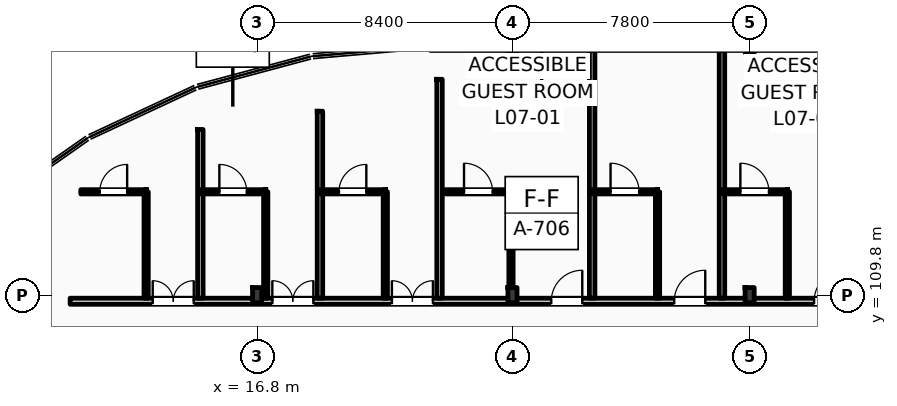
"""IFC4 building model, lengths in metres.
Left out: names, types, materials, properties, quantities, classifications, styles, units other than length and angle.
Written with IfcOpenShell. Run it as: python <this file> out.ifc"""

import sys

from ifc_helpers import new_model, si_unit, direction, frame, frame_2d, origin, origin_2d, place, context, subcontext, project, spatial, rectangle, i_section, extrude, element, fill, save


model = new_model("IFC4")
c1 = context("Model", 3, precision=1e-05, world=origin(), true_north=direction((0.0, 1.0)))
c2 = subcontext(c1, "Body", "Model", "MODEL_VIEW")
j1 = project(units=[si_unit("LENGTHUNIT", "METRE"), si_unit("PLANEANGLEUNIT", "RADIAN")], contexts=[c1])
p1 = place(None, origin())
s1 = spatial("IfcSite", under=j1, at=p1, CompositionType="ELEMENT")
p2 = place(p1, origin())
s2 = spatial("IfcBuilding", under=s1, at=p2, CompositionType="ELEMENT")
p3 = place(p2, frame((0.0, 0.0, 31.8)))
s3 = spatial("IfcBuildingStorey", under=s2, at=p3, CompositionType="ELEMENT", Elevation=31.8)
for number, where, z_axis, x_axis in (
    (1, (16.8, 109.8, 0.0), (0.0, 0.0, 1.0), (1.0, 0.0, 0.0)),
    (2, (25.2, 109.8, 0.0), (0.0, 0.0, 1.0), (1.0, 0.0, 0.0)),
):
    element("IfcColumn", number, at=place(p3, frame(where, z_axis=z_axis, x_axis=x_axis)), inside=s3, PredefinedType="COLUMN", context=c2, shape_type="SweptSolid", body=[
        extrude(i_section(OverallWidth=0.3, OverallDepth=0.5, WebThickness=0.014, FlangeThickness=0.028, FilletRadius=0.027, at=origin_2d()), origin(), (0.0, 0.0, 1.0), 3.6),
    ])
p4 = place(p3, frame((25.2, 118.0, 0.0), z_axis=(0.0, 0.0, 1.0), x_axis=(1.0, 0.0, 0.0)))
e3 = element("IfcColumn", 3, at=p4, inside=s3, PredefinedType="COLUMN", context=c2, shape_type="SweptSolid", body=[
    extrude(i_section(OverallWidth=0.3, OverallDepth=0.45, WebThickness=0.014, FlangeThickness=0.026, FilletRadius=0.027, at=origin_2d()), origin(), (0.0, 0.0, 1.0), 3.6),
])
p5 = place(p3, frame((33.0, 109.8, 0.0), z_axis=(0.0, 0.0, 1.0), x_axis=(1.0, 0.0, 0.0)))
e4 = element("IfcColumn", 4, at=p5, inside=s3, PredefinedType="COLUMN", context=c2, shape_type="SweptSolid", body=[
    extrude(i_section(OverallWidth=0.3, OverallDepth=0.5, WebThickness=0.014, FlangeThickness=0.028, FilletRadius=0.027, at=origin_2d()), origin(), (0.0, 0.0, 1.0), 3.6),
])
p6 = place(p3, frame((33.0, 118.0, 0.0), z_axis=(0.0, 0.0, 1.0), x_axis=(1.0, 0.0, 0.0)))
e5 = element("IfcColumn", 5, at=p6, inside=s3, PredefinedType="COLUMN", context=c2, shape_type="SweptSolid", body=[
    extrude(i_section(OverallWidth=0.3, OverallDepth=0.45, WebThickness=0.014, FlangeThickness=0.026, FilletRadius=0.027, at=origin_2d()), origin(), (0.0, 0.0, 1.0), 3.6),
])
p7 = place(p3, frame((10.65, 109.6, 0.0), z_axis=(0.0, 0.0, 1.0), x_axis=(1.0, 0.0, 0.0)))
e6 = element("IfcWall", 6, at=p7, inside=s3, PredefinedType="PARTITIONING", context=c2, shape_type="SweptSolid", body=[
    extrude(rectangle(XDim=109.21, YDim=0.2, at=frame_2d((54.605, 0.0))), origin(), (0.0, 0.0, 1.0), 2.72),
])
p8 = place(p7, frame((15.825, 0.0, 0.0)))
e7 = element("IfcOpeningElement", 7, at=p8, cuts=e6, PredefinedType="OPENING", context=c2, shape_type="SweptSolid", body=[
    extrude(rectangle(XDim=1.02, YDim=2.2, at=frame_2d((0.51, 1.1))), frame((0.0, 0.11, 0.0), z_axis=(0.0, -1.0, 0.0), x_axis=(1.0, 0.0, 0.0)), (0.0, 0.0, 1.0), 0.22),
])
p9 = place(p7, frame((19.87, 0.0, 0.0)))
e8 = element("IfcOpeningElement", 8, at=p9, cuts=e6, PredefinedType="OPENING", context=c2, shape_type="SweptSolid", body=[
    extrude(rectangle(XDim=1.02, YDim=2.2, at=frame_2d((0.51, 1.1))), frame((0.0, 0.11, 0.0), z_axis=(0.0, -1.0, 0.0), x_axis=(1.0, 0.0, 0.0)), (0.0, 0.0, 1.0), 0.22),
])
p10 = place(p7, frame((24.47, 0.0, 0.0)))
e9 = element("IfcOpeningElement", 9, at=p10, cuts=e6, PredefinedType="OPENING", context=c2, shape_type="SweptSolid", body=[
    extrude(rectangle(XDim=1.02, YDim=2.2, at=frame_2d((0.51, 1.1))), frame((0.0, 0.11, 0.0), z_axis=(0.0, -1.0, 0.0), x_axis=(1.0, 0.0, 0.0)), (0.0, 0.0, 1.0), 0.22),
])
p11 = place(p7, frame((26.92, 0.0, 0.0)))
e10 = element("IfcOpeningElement", 10, at=p11, cuts=e6, PredefinedType="OPENING", context=c2, shape_type="SweptSolid", body=[
    extrude(rectangle(XDim=1.02, YDim=2.2, at=frame_2d((0.51, 1.1))), frame((0.0, 0.11, 0.0), z_axis=(0.0, -1.0, 0.0), x_axis=(1.0, 0.0, 0.0)), (0.0, 0.0, 1.0), 0.22),
])
p12 = place(p7, frame((33.7, 0.0, 0.0)))
e11 = element("IfcOpeningElement", 11, at=p12, cuts=e6, PredefinedType="OPENING", context=c2, shape_type="SweptSolid", body=[
    extrude(rectangle(XDim=0.96, YDim=2.2, at=frame_2d((0.48, 1.1))), frame((0.0, 0.11, 0.0), z_axis=(0.0, -1.0, 0.0), x_axis=(1.0, 0.0, 0.0)), (0.0, 0.0, 1.0), 0.22),
])
p13 = place(p7, frame((35.9, 0.0, 0.0)))
e12 = element("IfcOpeningElement", 12, at=p13, cuts=e6, PredefinedType="OPENING", context=c2, shape_type="SweptSolid", body=[
    extrude(rectangle(XDim=0.96, YDim=2.2, at=frame_2d((0.48, 1.1))), frame((0.0, 0.11, 0.0), z_axis=(0.0, -1.0, 0.0), x_axis=(1.0, 0.0, 0.0)), (0.0, 0.0, 1.0), 0.22),
])
p14 = place(p7, frame((42.9, 0.0, 0.0)))
e13 = element("IfcOpeningElement", 13, at=p14, cuts=e6, PredefinedType="OPENING", context=c2, shape_type="SweptSolid", body=[
    extrude(rectangle(XDim=0.96, YDim=2.2, at=frame_2d((0.48, 1.1))), frame((0.0, 0.11, 0.0), z_axis=(0.0, -1.0, 0.0), x_axis=(1.0, 0.0, 0.0)), (0.0, 0.0, 1.0), 0.22),
])
p15 = place(p7, frame((47.5, 0.0, 0.0)))
e14 = element("IfcOpeningElement", 14, at=p15, cuts=e6, PredefinedType="OPENING", context=c2, shape_type="SweptSolid", body=[
    extrude(rectangle(XDim=0.96, YDim=2.2, at=frame_2d((0.48, 1.1))), frame((0.0, 0.11, 0.0), z_axis=(0.0, -1.0, 0.0), x_axis=(1.0, 0.0, 0.0)), (0.0, 0.0, 1.0), 0.22),
])
p16 = place(p7, frame((49.95, 0.0, 0.0)))
e15 = element("IfcOpeningElement", 15, at=p16, cuts=e6, PredefinedType="OPENING", context=c2, shape_type="SweptSolid", body=[
    extrude(rectangle(XDim=0.96, YDim=2.2, at=frame_2d((0.48, 1.1))), frame((0.0, 0.11, 0.0), z_axis=(0.0, -1.0, 0.0), x_axis=(1.0, 0.0, 0.0)), (0.0, 0.0, 1.0), 0.22),
])
p17 = place(p7, frame((56.7, 0.0, 0.0)))
e16 = element("IfcOpeningElement", 16, at=p17, cuts=e6, PredefinedType="OPENING", context=c2, shape_type="SweptSolid", body=[
    extrude(rectangle(XDim=0.96, YDim=2.2, at=frame_2d((0.48, 1.1))), frame((0.0, 0.11, 0.0), z_axis=(0.0, -1.0, 0.0), x_axis=(1.0, 0.0, 0.0)), (0.0, 0.0, 1.0), 0.22),
])
p18 = place(p7, frame((59.15, 0.0, 0.0)))
e17 = element("IfcOpeningElement", 17, at=p18, cuts=e6, PredefinedType="OPENING", context=c2, shape_type="SweptSolid", body=[
    extrude(rectangle(XDim=0.96, YDim=2.2, at=frame_2d((0.48, 1.1))), frame((0.0, 0.11, 0.0), z_axis=(0.0, -1.0, 0.0), x_axis=(1.0, 0.0, 0.0)), (0.0, 0.0, 1.0), 0.22),
])
p19 = place(p7, frame((65.9, 0.0, 0.0)))
e18 = element("IfcOpeningElement", 18, at=p19, cuts=e6, PredefinedType="OPENING", context=c2, shape_type="SweptSolid", body=[
    extrude(rectangle(XDim=0.96, YDim=2.2, at=frame_2d((0.48, 1.1))), frame((0.0, 0.11, 0.0), z_axis=(0.0, -1.0, 0.0), x_axis=(1.0, 0.0, 0.0)), (0.0, 0.0, 1.0), 0.22),
])
p20 = place(p7, frame((70.5, 0.0, 0.0)))
e19 = element("IfcOpeningElement", 19, at=p20, cuts=e6, PredefinedType="OPENING", context=c2, shape_type="SweptSolid", body=[
    extrude(rectangle(XDim=0.96, YDim=2.2, at=frame_2d((0.48, 1.1))), frame((0.0, 0.11, 0.0), z_axis=(0.0, -1.0, 0.0), x_axis=(1.0, 0.0, 0.0)), (0.0, 0.0, 1.0), 0.22),
])
p21 = place(p7, frame((72.95, 0.0, 0.0)))
e20 = element("IfcOpeningElement", 20, at=p21, cuts=e6, PredefinedType="OPENING", context=c2, shape_type="SweptSolid", body=[
    extrude(rectangle(XDim=0.96, YDim=2.2, at=frame_2d((0.48, 1.1))), frame((0.0, 0.11, 0.0), z_axis=(0.0, -1.0, 0.0), x_axis=(1.0, 0.0, 0.0)), (0.0, 0.0, 1.0), 0.22),
])
p22 = place(p7, frame((79.7, 0.0, 0.0)))
e21 = element("IfcOpeningElement", 21, at=p22, cuts=e6, PredefinedType="OPENING", context=c2, shape_type="SweptSolid", body=[
    extrude(rectangle(XDim=0.96, YDim=2.2, at=frame_2d((0.48, 1.1))), frame((0.0, 0.11, 0.0), z_axis=(0.0, -1.0, 0.0), x_axis=(1.0, 0.0, 0.0)), (0.0, 0.0, 1.0), 0.22),
])
p23 = place(p7, frame((82.15, 0.0, 0.0)))
e22 = element("IfcOpeningElement", 22, at=p23, cuts=e6, PredefinedType="OPENING", context=c2, shape_type="SweptSolid", body=[
    extrude(rectangle(XDim=0.96, YDim=2.2, at=frame_2d((0.48, 1.1))), frame((0.0, 0.11, 0.0), z_axis=(0.0, -1.0, 0.0), x_axis=(1.0, 0.0, 0.0)), (0.0, 0.0, 1.0), 0.22),
])
p24 = place(p7, frame((88.9, 0.0, 0.0)))
e23 = element("IfcOpeningElement", 23, at=p24, cuts=e6, PredefinedType="OPENING", context=c2, shape_type="SweptSolid", body=[
    extrude(rectangle(XDim=0.96, YDim=2.2, at=frame_2d((0.48, 1.1))), frame((0.0, 0.11, 0.0), z_axis=(0.0, -1.0, 0.0), x_axis=(1.0, 0.0, 0.0)), (0.0, 0.0, 1.0), 0.22),
])
p25 = place(p7, frame((93.75, 0.0, 0.0)))
e24 = element("IfcOpeningElement", 24, at=p25, cuts=e6, PredefinedType="OPENING", context=c2, shape_type="SweptSolid", body=[
    extrude(rectangle(XDim=0.96, YDim=2.2, at=frame_2d((0.48, 1.1))), frame((0.0, 0.11, 0.0), z_axis=(0.0, -1.0, 0.0), x_axis=(1.0, 0.0, 0.0)), (0.0, 0.0, 1.0), 0.22),
])
p26 = place(p7, frame((98.1, 0.0, 0.0)))
e25 = element("IfcOpeningElement", 25, at=p26, cuts=e6, PredefinedType="OPENING", context=c2, shape_type="SweptSolid", body=[
    extrude(rectangle(XDim=0.96, YDim=2.2, at=frame_2d((0.48, 1.1))), frame((0.0, 0.11, 0.0), z_axis=(0.0, -1.0, 0.0), x_axis=(1.0, 0.0, 0.0)), (0.0, 0.0, 1.0), 0.22),
])
p27 = place(p7, frame((102.7, 0.0, 0.0)))
e26 = element("IfcOpeningElement", 26, at=p27, cuts=e6, PredefinedType="OPENING", context=c2, shape_type="SweptSolid", body=[
    extrude(rectangle(XDim=0.96, YDim=2.2, at=frame_2d((0.48, 1.1))), frame((0.0, 0.11, 0.0), z_axis=(0.0, -1.0, 0.0), x_axis=(1.0, 0.0, 0.0)), (0.0, 0.0, 1.0), 0.22),
])
p28 = place(p7, frame((105.04, 0.0, 0.0)))
e27 = element("IfcOpeningElement", 27, at=p28, cuts=e6, PredefinedType="OPENING", context=c2, shape_type="SweptSolid", body=[
    extrude(rectangle(XDim=0.96, YDim=2.2, at=frame_2d((0.48, 1.1))), frame((0.0, 0.11, 0.0), z_axis=(0.0, -1.0, 0.0), x_axis=(1.0, 0.0, 0.0)), (0.0, 0.0, 1.0), 0.22),
])
p29 = place(p7, frame((2.716, 0.0, 0.0)))
e28 = element("IfcOpeningElement", 28, at=p29, cuts=e6, PredefinedType="OPENING", context=c2, shape_type="SweptSolid", body=[
    extrude(rectangle(XDim=1.35, YDim=2.25, at=frame_2d((0.675, 1.125))), frame((0.0, 0.11, 0.0), z_axis=(0.0, -1.0, 0.0), x_axis=(1.0, 0.0, 0.0)), (0.0, 0.0, 1.0), 0.22),
])
p30 = place(p7, frame((6.65, 0.0, 0.0)))
e29 = element("IfcOpeningElement", 29, at=p30, cuts=e6, PredefinedType="OPENING", context=c2, shape_type="SweptSolid", body=[
    extrude(rectangle(XDim=1.35, YDim=2.25, at=frame_2d((0.675, 1.125))), frame((0.0, 0.11, 0.0), z_axis=(0.0, -1.0, 0.0), x_axis=(1.0, 0.0, 0.0)), (0.0, 0.0, 1.0), 0.22),
])
p31 = place(p7, frame((10.583, 0.0, 0.0)))
e30 = element("IfcOpeningElement", 30, at=p31, cuts=e6, PredefinedType="OPENING", context=c2, shape_type="SweptSolid", body=[
    extrude(rectangle(XDim=1.35, YDim=2.25, at=frame_2d((0.675, 1.125))), frame((0.0, 0.11, 0.0), z_axis=(0.0, -1.0, 0.0), x_axis=(1.0, 0.0, 0.0)), (0.0, 0.0, 1.0), 0.22),
])
p32 = place(p3, frame((27.82, 109.7, 0.0), z_axis=(0.0, 0.0, 1.0), x_axis=(0.0, 1.0, 0.0)))
e31 = element("IfcWall", 31, at=p32, inside=s3, PredefinedType="PARTITIONING", context=c2, shape_type="SweptSolid", body=[
    extrude(rectangle(XDim=8.15, YDim=0.18, at=frame_2d((4.075, 0.0))), origin(), (0.0, 0.0, 1.0), 3.05),
])
p33 = place(p3, frame((25.15, 109.7, 0.0), z_axis=(0.0, 0.0, 1.0), x_axis=(0.0, 1.0, 0.0)))
e32 = element("IfcWall", 32, at=p33, inside=s3, PredefinedType="PARTITIONING", context=c2, shape_type="SweptSolid", body=[
    extrude(rectangle(XDim=3.5, YDim=0.14, at=frame_2d((1.75, 0.0))), origin(), (0.0, 0.0, 1.0), 2.99),
])
p34 = place(p3, frame((23.0, 113.2, 0.0), z_axis=(0.0, 0.0, 1.0), x_axis=(1.0, 0.0, 0.0)))
e33 = element("IfcWall", 33, at=p34, inside=s3, PredefinedType="PARTITIONING", context=c2, shape_type="SweptSolid", body=[
    extrude(rectangle(XDim=2.15, YDim=0.14, at=frame_2d((1.075, 0.0))), origin(), (0.0, 0.0, 1.0), 3.36),
])
p35 = place(p34, frame((0.605, 0.0, 0.0)))
e34 = element("IfcOpeningElement", 34, at=p35, cuts=e33, PredefinedType="OPENING", context=c2, shape_type="SweptSolid", body=[
    extrude(rectangle(XDim=0.94, YDim=2.15, at=frame_2d((0.47, 1.075))), frame((0.0, 0.08, 0.0), z_axis=(0.0, -1.0, 0.0), x_axis=(1.0, 0.0, 0.0)), (0.0, 0.0, 1.0), 0.16),
])
p36 = place(p3, frame((32.09, 109.7, 0.0), z_axis=(0.0, 0.0, 1.0), x_axis=(0.0, 1.0, 0.0)))
e35 = element("IfcWall", 35, at=p36, inside=s3, PredefinedType="PARTITIONING", context=c2, shape_type="SweptSolid", body=[
    extrude(rectangle(XDim=8.15, YDim=0.18, at=frame_2d((4.075, 0.0))), origin(), (0.0, 0.0, 1.0), 3.36),
])
p37 = place(p3, frame((29.97, 109.7, 0.0), z_axis=(0.0, 0.0, 1.0), x_axis=(0.0, 1.0, 0.0)))
e36 = element("IfcWall", 36, at=p37, inside=s3, PredefinedType="PARTITIONING", context=c2, shape_type="SweptSolid", body=[
    extrude(rectangle(XDim=3.5, YDim=0.14, at=frame_2d((1.75, 0.0))), origin(), (0.0, 0.0, 1.0), 3.36),
])
p38 = place(p3, frame((27.82, 113.2, 0.0), z_axis=(0.0, 0.0, 1.0), x_axis=(1.0, 0.0, 0.0)))
e37 = element("IfcWall", 37, at=p38, inside=s3, PredefinedType="PARTITIONING", context=c2, shape_type="SweptSolid", body=[
    extrude(rectangle(XDim=2.15, YDim=0.14, at=frame_2d((1.075, 0.0))), origin(), (0.0, 0.0, 1.0), 3.36),
])
p39 = place(p38, frame((0.605, 0.0, 0.0)))
e38 = element("IfcOpeningElement", 38, at=p39, cuts=e37, PredefinedType="OPENING", context=c2, shape_type="SweptSolid", body=[
    extrude(rectangle(XDim=0.94, YDim=2.15, at=frame_2d((0.47, 1.075))), frame((0.0, 0.08, 0.0), z_axis=(0.0, -1.0, 0.0), x_axis=(1.0, 0.0, 0.0)), (0.0, 0.0, 1.0), 0.16),
])
p40 = place(p3, frame((34.24, 109.7, 0.0), z_axis=(0.0, 0.0, 1.0), x_axis=(0.0, 1.0, 0.0)))
e39 = element("IfcWall", 39, at=p40, inside=s3, PredefinedType="PARTITIONING", context=c2, shape_type="SweptSolid", body=[
    extrude(rectangle(XDim=3.5, YDim=0.14, at=frame_2d((1.75, 0.0))), origin(), (0.0, 0.0, 1.0), 3.36),
])
p41 = place(p3, frame((32.09, 113.2, 0.0), z_axis=(0.0, 0.0, 1.0), x_axis=(1.0, 0.0, 0.0)))
e40 = element("IfcWall", 40, at=p41, inside=s3, PredefinedType="PARTITIONING", context=c2, shape_type="SweptSolid", body=[
    extrude(rectangle(XDim=2.15, YDim=0.14, at=frame_2d((1.075, 0.0))), origin(), (0.0, 0.0, 1.0), 3.36),
])
p42 = place(p41, frame((0.605, 0.0, 0.0)))
e41 = element("IfcOpeningElement", 41, at=p42, cuts=e40, PredefinedType="OPENING", context=c2, shape_type="SweptSolid", body=[
    extrude(rectangle(XDim=0.94, YDim=2.15, at=frame_2d((0.47, 1.075))), frame((0.0, 0.08, 0.0), z_axis=(0.0, -1.0, 0.0), x_axis=(1.0, 0.0, 0.0)), (0.0, 0.0, 1.0), 0.16),
])
p43 = place(p3, frame((14.933, 109.7, 0.0), z_axis=(0.0, 0.0, 1.0), x_axis=(0.0, 1.0, 0.0)))
e42 = element("IfcWall", 42, at=p43, inside=s3, PredefinedType="PARTITIONING", context=c2, shape_type="SweptSolid", body=[
    extrude(rectangle(XDim=5.55, YDim=0.18, at=frame_2d((2.775, 0.0))), origin(), (0.0, 0.0, 1.0), 3.36),
])
p44 = place(p3, frame((13.15, 109.7, 0.0), z_axis=(0.0, 0.0, 1.0), x_axis=(0.0, 1.0, 0.0)))
e43 = element("IfcWall", 43, at=p44, inside=s3, PredefinedType="PARTITIONING", context=c2, shape_type="SweptSolid", body=[
    extrude(rectangle(XDim=3.5, YDim=0.14, at=frame_2d((1.75, 0.0))), origin(), (0.0, 0.0, 1.0), 3.36),
])
p45 = place(p3, frame((11.0, 113.2, 0.0), z_axis=(0.0, 0.0, 1.0), x_axis=(1.0, 0.0, 0.0)))
e44 = element("IfcWall", 44, at=p45, inside=s3, PredefinedType="PARTITIONING", context=c2, shape_type="SweptSolid", body=[
    extrude(rectangle(XDim=2.15, YDim=0.14, at=frame_2d((1.075, 0.0))), origin(), (0.0, 0.0, 1.0), 3.36),
])
p46 = place(p45, frame((0.625, 0.0, 0.0)))
e45 = element("IfcOpeningElement", 45, at=p46, cuts=e44, PredefinedType="OPENING", context=c2, shape_type="SweptSolid", body=[
    extrude(rectangle(XDim=0.9, YDim=2.1, at=frame_2d((0.45, 1.05))), frame((0.0, 0.08, 0.0), z_axis=(0.0, -1.0, 0.0), x_axis=(1.0, 0.0, 0.0)), (0.0, 0.0, 1.0), 0.16),
])
p47 = place(p3, frame((18.867, 109.7, 0.0), z_axis=(0.0, 0.0, 1.0), x_axis=(0.0, 1.0, 0.0)))
e46 = element("IfcWall", 46, at=p47, inside=s3, PredefinedType="PARTITIONING", context=c2, shape_type="SweptSolid", body=[
    extrude(rectangle(XDim=6.15, YDim=0.18, at=frame_2d((3.075, 0.0))), origin(), (0.0, 0.0, 1.0), 3.36),
])
p48 = place(p3, frame((17.083, 109.7, 0.0), z_axis=(0.0, 0.0, 1.0), x_axis=(0.0, 1.0, 0.0)))
e47 = element("IfcWall", 47, at=p48, inside=s3, PredefinedType="PARTITIONING", context=c2, shape_type="SweptSolid", body=[
    extrude(rectangle(XDim=3.5, YDim=0.14, at=frame_2d((1.75, 0.0))), origin(), (0.0, 0.0, 1.0), 3.36),
])
p49 = place(p3, frame((14.933, 113.2, 0.0), z_axis=(0.0, 0.0, 1.0), x_axis=(1.0, 0.0, 0.0)))
e48 = element("IfcWall", 48, at=p49, inside=s3, PredefinedType="PARTITIONING", context=c2, shape_type="SweptSolid", body=[
    extrude(rectangle(XDim=2.15, YDim=0.14, at=frame_2d((1.075, 0.0))), origin(), (0.0, 0.0, 1.0), 3.36),
])
p50 = place(p49, frame((0.625, 0.0, 0.0)))
e49 = element("IfcOpeningElement", 49, at=p50, cuts=e48, PredefinedType="OPENING", context=c2, shape_type="SweptSolid", body=[
    extrude(rectangle(XDim=0.9, YDim=2.1, at=frame_2d((0.45, 1.05))), frame((0.0, 0.08, 0.0), z_axis=(0.0, -1.0, 0.0), x_axis=(1.0, 0.0, 0.0)), (0.0, 0.0, 1.0), 0.16),
])
p51 = place(p3, frame((22.8, 109.7, 0.0), z_axis=(0.0, 0.0, 1.0), x_axis=(0.0, 1.0, 0.0)))
e50 = element("IfcWall", 50, at=p51, inside=s3, PredefinedType="PARTITIONING", context=c2, shape_type="SweptSolid", body=[
    extrude(rectangle(XDim=7.2, YDim=0.18, at=frame_2d((3.6, 0.0))), origin(), (0.0, 0.0, 1.0), 3.36),
])
p52 = place(p3, frame((21.017, 109.7, 0.0), z_axis=(0.0, 0.0, 1.0), x_axis=(0.0, 1.0, 0.0)))
e51 = element("IfcWall", 51, at=p52, inside=s3, PredefinedType="PARTITIONING", context=c2, shape_type="SweptSolid", body=[
    extrude(rectangle(XDim=3.5, YDim=0.14, at=frame_2d((1.75, 0.0))), origin(), (0.0, 0.0, 1.0), 3.36),
])
p53 = place(p3, frame((18.867, 113.2, 0.0), z_axis=(0.0, 0.0, 1.0), x_axis=(1.0, 0.0, 0.0)))
e52 = element("IfcWall", 52, at=p53, inside=s3, PredefinedType="PARTITIONING", context=c2, shape_type="SweptSolid", body=[
    extrude(rectangle(XDim=2.15, YDim=0.14, at=frame_2d((1.075, 0.0))), origin(), (0.0, 0.0, 1.0), 3.36),
])
p54 = place(p53, frame((0.625, 0.0, 0.0)))
e53 = element("IfcOpeningElement", 53, at=p54, cuts=e52, PredefinedType="OPENING", context=c2, shape_type="SweptSolid", body=[
    extrude(rectangle(XDim=0.9, YDim=2.1, at=frame_2d((0.45, 1.05))), frame((0.0, 0.08, 0.0), z_axis=(0.0, -1.0, 0.0), x_axis=(1.0, 0.0, 0.0)), (0.0, 0.0, 1.0), 0.16),
])
p55 = place(p8, origin())
e54 = element("IfcDoor", 54, at=p55, inside=s3, OperationType="SINGLE_SWING_RIGHT", PredefinedType="DOOR", context=c2, shape_type="SweptSolid", body=[
    extrude(rectangle(XDim=1.02, YDim=2.2, at=frame_2d((0.51, 1.1))), frame((0.0, 0.025, 0.0), z_axis=(0.0, -1.0, 0.0), x_axis=(1.0, 0.0, 0.0)), (0.0, 0.0, 1.0), 0.05),
])
fill(e7, e54)
p56 = place(p35, origin())
e55 = element("IfcDoor", 55, at=p56, inside=s3, OperationType="SINGLE_SWING_LEFT", PredefinedType="DOOR", context=c2, shape_type="SweptSolid", body=[
    extrude(rectangle(XDim=0.94, YDim=2.15, at=frame_2d((0.47, 1.075))), frame((0.0, 0.025, 0.0), z_axis=(0.0, -1.0, 0.0), x_axis=(1.0, 0.0, 0.0)), (0.0, 0.0, 1.0), 0.05),
])
fill(e34, e55)
p57 = place(p9, origin())
e56 = element("IfcDoor", 56, at=p57, inside=s3, OperationType="SINGLE_SWING_RIGHT", PredefinedType="DOOR", context=c2, shape_type="SweptSolid", body=[
    extrude(rectangle(XDim=1.02, YDim=2.2, at=frame_2d((0.51, 1.1))), frame((0.0, 0.025, 0.0), z_axis=(0.0, -1.0, 0.0), x_axis=(1.0, 0.0, 0.0)), (0.0, 0.0, 1.0), 0.05),
])
fill(e8, e56)
p58 = place(p39, origin())
e57 = element("IfcDoor", 57, at=p58, inside=s3, OperationType="SINGLE_SWING_LEFT", PredefinedType="DOOR", context=c2, shape_type="SweptSolid", body=[
    extrude(rectangle(XDim=0.94, YDim=2.15, at=frame_2d((0.47, 1.075))), frame((0.0, 0.025, 0.0), z_axis=(0.0, -1.0, 0.0), x_axis=(1.0, 0.0, 0.0)), (0.0, 0.0, 1.0), 0.05),
])
fill(e38, e57)
p59 = place(p10, origin())
e58 = element("IfcDoor", 58, at=p59, inside=s3, OperationType="SINGLE_SWING_RIGHT", PredefinedType="DOOR", context=c2, shape_type="SweptSolid", body=[
    extrude(rectangle(XDim=1.02, YDim=2.2, at=frame_2d((0.51, 1.1))), frame((0.0, 0.025, 0.0), z_axis=(0.0, -1.0, 0.0), x_axis=(1.0, 0.0, 0.0)), (0.0, 0.0, 1.0), 0.05),
])
fill(e9, e58)
p60 = place(p42, origin())
e59 = element("IfcDoor", 59, at=p60, inside=s3, OperationType="SINGLE_SWING_LEFT", PredefinedType="DOOR", context=c2, shape_type="SweptSolid", body=[
    extrude(rectangle(XDim=0.94, YDim=2.15, at=frame_2d((0.47, 1.075))), frame((0.0, 0.025, 0.0), z_axis=(0.0, -1.0, 0.0), x_axis=(1.0, 0.0, 0.0)), (0.0, 0.0, 1.0), 0.05),
])
fill(e41, e59)
p61 = place(p29, origin())
e60 = element("IfcDoor", 60, at=p61, inside=s3, OperationType="DOUBLE_SWING_LEFT", PredefinedType="DOOR", context=c2, shape_type="SweptSolid", body=[
    extrude(rectangle(XDim=1.35, YDim=2.25, at=frame_2d((0.675, 1.125))), frame((0.0, 0.025, 0.0), z_axis=(0.0, -1.0, 0.0), x_axis=(1.0, 0.0, 0.0)), (0.0, 0.0, 1.0), 0.05),
])
fill(e28, e60)
p62 = place(p46, origin())
e61 = element("IfcDoor", 61, at=p62, inside=s3, OperationType="SINGLE_SWING_RIGHT", PredefinedType="DOOR", context=c2, shape_type="SweptSolid", body=[
    extrude(rectangle(XDim=0.9, YDim=2.1, at=frame_2d((0.45, 1.05))), frame((0.0, 0.025, 0.0), z_axis=(0.0, -1.0, 0.0), x_axis=(1.0, 0.0, 0.0)), (0.0, 0.0, 1.0), 0.05),
])
fill(e45, e61)
p63 = place(p30, origin())
e62 = element("IfcDoor", 62, at=p63, inside=s3, OperationType="DOUBLE_SWING_LEFT", PredefinedType="DOOR", context=c2, shape_type="SweptSolid", body=[
    extrude(rectangle(XDim=1.35, YDim=2.25, at=frame_2d((0.675, 1.125))), frame((0.0, 0.025, 0.0), z_axis=(0.0, -1.0, 0.0), x_axis=(1.0, 0.0, 0.0)), (0.0, 0.0, 1.0), 0.05),
])
fill(e29, e62)
p64 = place(p50, origin())
e63 = element("IfcDoor", 63, at=p64, inside=s3, OperationType="SINGLE_SWING_LEFT", PredefinedType="DOOR", context=c2, shape_type="SweptSolid", body=[
    extrude(rectangle(XDim=0.9, YDim=2.1, at=frame_2d((0.45, 1.05))), frame((0.0, 0.025, 0.0), z_axis=(0.0, -1.0, 0.0), x_axis=(1.0, 0.0, 0.0)), (0.0, 0.0, 1.0), 0.05),
])
fill(e49, e63)
p65 = place(p31, origin())
e64 = element("IfcDoor", 64, at=p65, inside=s3, OperationType="DOUBLE_SWING_LEFT", PredefinedType="DOOR", context=c2, shape_type="SweptSolid", body=[
    extrude(rectangle(XDim=1.35, YDim=2.25, at=frame_2d((0.675, 1.125))), frame((0.0, 0.025, 0.0), z_axis=(0.0, -1.0, 0.0), x_axis=(1.0, 0.0, 0.0)), (0.0, 0.0, 1.0), 0.05),
])
fill(e30, e64)
p66 = place(p54, origin())
e65 = element("IfcDoor", 65, at=p66, inside=s3, OperationType="SINGLE_SWING_RIGHT", PredefinedType="DOOR", context=c2, shape_type="SweptSolid", body=[
    extrude(rectangle(XDim=0.9, YDim=2.1, at=frame_2d((0.45, 1.05))), frame((0.0, 0.025, 0.0), z_axis=(0.0, -1.0, 0.0), x_axis=(1.0, 0.0, 0.0)), (0.0, 0.0, 1.0), 0.05),
])
fill(e53, e65)
save(model, sys.argv[1])
